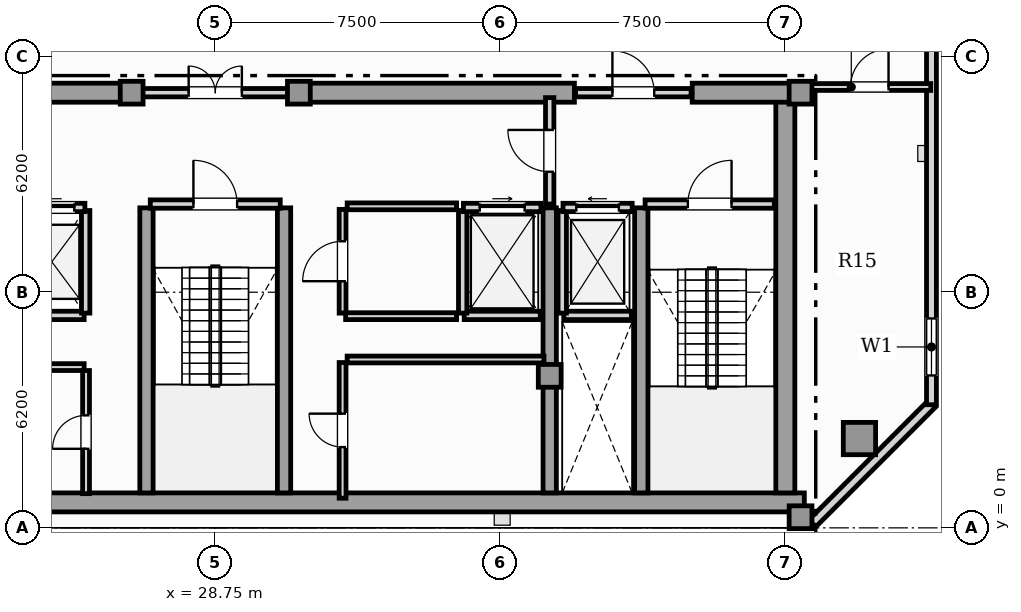
"""IFC4 building model, lengths in metres.
Left out: names, types, materials, properties, quantities, classifications, styles, units other than length and angle.
Written with IfcOpenShell. Run it as: python <this file> out.ifc"""

import sys

from ifc_helpers import new_model, si_unit, direction, frame, frame_2d, origin, origin_2d, place, context, subcontext, project, spatial, rectangle, hollow_rectangle, extrude, element, fill, save


model = new_model("IFC4")
c1 = context("Model", 3, precision=1e-05, world=origin(), true_north=direction((0.0, 1.0)))
c2 = subcontext(c1, "Body", "Model", "MODEL_VIEW")
j1 = project(units=[si_unit("LENGTHUNIT", "METRE"), si_unit("PLANEANGLEUNIT", "RADIAN")], contexts=[c1])
p1 = place(None, origin())
s1 = spatial("IfcSite", under=j1, at=p1, CompositionType="ELEMENT")
p2 = place(p1, origin())
s2 = spatial("IfcBuilding", under=s1, at=p2, CompositionType="ELEMENT")
p3 = place(p2, frame((0.0, 0.0, 362.25)))
s3 = spatial("IfcBuildingStorey", under=s2, at=p3, CompositionType="ELEMENT", Elevation=362.25)
p4 = place(p3, frame((13.25, 0.67, 0.0), z_axis=(0.0, 0.0, 1.0), x_axis=(1.0, 0.0, 0.0)))
e1 = element("IfcWall", 1, at=p4, inside=s3, PredefinedType="SHEAR", context=c2, shape_type="SweptSolid", body=[
    extrude(rectangle(XDim=31.0, YDim=0.5, at=frame_2d((15.5, 0.0))), origin(), (0.0, 0.0, 1.0), 4.1),
])
p5 = place(p3, frame((43.75, 0.92, 0.0), z_axis=(0.0, 0.0, 1.0), x_axis=(0.0, 1.0, 0.0)))
e2 = element("IfcWall", 2, at=p5, inside=s3, PredefinedType="SHEAR", context=c2, shape_type="SweptSolid", body=[
    extrude(rectangle(XDim=10.53, YDim=0.5, at=frame_2d((5.265, 0.0))), origin(), (0.0, 0.0, 1.0), 4.1),
])
for number, where, z_axis, x_axis in (
    (3, (19.3, 11.45, 0.0), (0.0, 0.0, 1.0), (1.0, 0.0, 0.0)),
    (4, (30.9, 11.45, 0.0), (0.0, 0.0, 1.0), (1.0, 0.0, 0.0)),
):
    element("IfcWall", number, at=place(p3, frame(where, z_axis=z_axis, x_axis=x_axis)), inside=s3, PredefinedType="SHEAR", context=c2, shape_type="SweptSolid", body=[
        extrude(rectangle(XDim=7.3, YDim=0.5, at=frame_2d((3.65, 0.0))), origin(), (0.0, 0.0, 1.0), 4.1),
    ])
p6 = place(p3, frame((41.3, 11.45, 0.0), z_axis=(0.0, 0.0, 1.0), x_axis=(1.0, 0.0, 0.0)))
e5 = element("IfcWall", 5, at=p6, inside=s3, PredefinedType="SHEAR", context=c2, shape_type="SweptSolid", body=[
    extrude(rectangle(XDim=2.95, YDim=0.5, at=frame_2d((1.475, 0.0))), origin(), (0.0, 0.0, 1.0), 4.1),
])
for number, where, z_axis, x_axis in (
    (6, (26.94, 0.92, 0.0), (0.0, 0.0, 1.0), (0.0, 1.0, 0.0)),
    (7, (30.56, 0.92, 0.0), (0.0, 0.0, 1.0), (0.0, 1.0, 0.0)),
    (8, (37.55, 0.92, 0.0), (0.0, 0.0, 1.0), (0.0, 1.0, 0.0)),
    (9, (39.96, 0.92, 0.0), (0.0, 0.0, 1.0), (0.0, 1.0, 0.0)),
):
    element("IfcWall", number, at=place(p3, frame(where, z_axis=z_axis, x_axis=x_axis)), inside=s3, PredefinedType="SHEAR", context=c2, shape_type="SweptSolid", body=[
        extrude(rectangle(XDim=7.5, YDim=0.35, at=frame_2d((3.75, 0.0))), origin(), (0.0, 0.0, 1.0), 4.1),
    ])
for number, where, z_axis, x_axis in (
    (10, (44.15, 0.28, 0.0), (0.0, 0.0, 1.0), (1.0, 0.0, 0.0)),
    (11, (44.15, 11.45, 0.0), (0.0, 0.0, 1.0), (1.0, 0.0, 0.0)),
    (12, (37.55, 4.0, 0.0), (0.0, 0.0, 1.0), (1.0, 0.0, 0.0)),
    (13, (26.55, 11.45, 0.0), (0.0, 0.0, 1.0), (1.0, 0.0, 0.0)),
    (14, (30.95, 11.45, 0.0), (0.0, 0.0, 1.0), (1.0, 0.0, 0.0)),
):
    element("IfcColumn", number, at=place(p3, frame(where, z_axis=z_axis, x_axis=x_axis)), inside=s3, PredefinedType="COLUMN", context=c2, shape_type="SweptSolid", body=[
        extrude(rectangle(XDim=0.6, YDim=0.6, at=origin_2d()), origin(), (0.0, 0.0, 1.0), 4.4),
    ])
p7 = place(p3, frame((45.7, 2.35, 0.0), z_axis=(0.0, 0.0, 1.0), x_axis=(1.0, 0.0, 0.0)))
e15 = element("IfcColumn", 15, at=p7, inside=s3, PredefinedType="USERDEFINED", context=c2, shape_type="SweptSolid", body=[
    extrude(hollow_rectangle(XDim=0.85, YDim=0.85, WallThickness=0.05, at=origin_2d()), origin(), (0.0, 0.0, 1.0), 4.35),
])
p8 = place(p3, frame((44.461, 0.12, 0.0), z_axis=(0.0, 0.0, 1.0), x_axis=(0.707079321262, 0.707134240044, 0.0)))
e16 = element("IfcWall", 16, at=p8, inside=s3, PredefinedType="SOLIDWALL", context=c2, shape_type="SweptSolid", body=[
    extrude(rectangle(XDim=4.446, YDim=0.26, at=frame_2d((2.223, 0.0))), origin(), (0.0, 0.0, 1.0), 4.1),
])
p9 = place(p3, frame((47.595, 3.24, 0.0), z_axis=(0.0, 0.0, 1.0), x_axis=(0.0, 1.0, 0.0)))
e17 = element("IfcWall", 17, at=p9, inside=s3, PredefinedType="SOLIDWALL", context=c2, shape_type="SweptSolid", body=[
    extrude(rectangle(XDim=24.14, YDim=0.26, at=frame_2d((12.07, 0.0))), origin(), (0.0, 0.0, 1.0), 4.1),
])
p10 = place(p9, frame((0.77, 0.0, 0.9)))
e18 = element("IfcOpeningElement", 18, at=p10, cuts=e17, PredefinedType="OPENING", context=c2, shape_type="SweptSolid", body=[
    extrude(rectangle(XDim=1.5, YDim=1.95, at=frame_2d((0.75, 0.975))), frame((0.0, 0.14, 0.0), z_axis=(0.0, -1.0, 0.0), x_axis=(1.0, 0.0, 0.0)), (0.0, 0.0, 1.0), 0.28),
])
p11 = place(p9, frame((20.41, 0.0, 0.95)))
e19 = element("IfcOpeningElement", 19, at=p11, cuts=e17, PredefinedType="OPENING", context=c2, shape_type="SweptSolid", body=[
    extrude(rectangle(XDim=0.9, YDim=1.5, at=frame_2d((0.45, 0.75))), frame((0.0, 0.14, 0.0), z_axis=(0.0, -1.0, 0.0), x_axis=(1.0, 0.0, 0.0)), (0.0, 0.0, 1.0), 0.28),
])
p12 = place(p9, frame((10.415, 0.0, 0.95)))
e20 = element("IfcOpeningElement", 20, at=p12, cuts=e17, PredefinedType="OPENING", context=c2, shape_type="SweptSolid", body=[
    extrude(rectangle(XDim=0.9, YDim=1.5, at=frame_2d((0.45, 0.75))), frame((0.0, 0.14, 0.0), z_axis=(0.0, -1.0, 0.0), x_axis=(1.0, 0.0, 0.0)), (0.0, 0.0, 1.0), 0.28),
])
p13 = place(p9, frame((12.876, 0.0, 0.9)))
e21 = element("IfcOpeningElement", 21, at=p13, cuts=e17, PredefinedType="OPENING", context=c2, shape_type="SweptSolid", body=[
    extrude(rectangle(XDim=1.5, YDim=1.95, at=frame_2d((0.75, 0.975))), frame((0.0, 0.14, 0.0), z_axis=(0.0, -1.0, 0.0), x_axis=(1.0, 0.0, 0.0)), (0.0, 0.0, 1.0), 0.28),
])
p14 = place(p9, frame((17.041, 0.0, 0.9)))
e22 = element("IfcOpeningElement", 22, at=p14, cuts=e17, PredefinedType="OPENING", context=c2, shape_type="SweptSolid", body=[
    extrude(rectangle(XDim=1.5, YDim=1.95, at=frame_2d((0.75, 0.975))), frame((0.0, 0.14, 0.0), z_axis=(0.0, -1.0, 0.0), x_axis=(1.0, 0.0, 0.0)), (0.0, 0.0, 1.0), 0.28),
])
p15 = place(p9, frame((21.87, 0.0, 0.9)))
e23 = element("IfcOpeningElement", 23, at=p15, cuts=e17, PredefinedType="OPENING", context=c2, shape_type="SweptSolid", body=[
    extrude(rectangle(XDim=1.5, YDim=1.95, at=frame_2d((0.75, 0.975))), frame((0.0, 0.14, 0.0), z_axis=(0.0, -1.0, 0.0), x_axis=(1.0, 0.0, 0.0)), (0.0, 0.0, 1.0), 0.28),
])
p16 = place(p3, frame((37.92, 5.59, 0.0), z_axis=(0.0, 0.0, 1.0), x_axis=(1.0, 0.0, 0.0)))
e24 = element("IfcWall", 24, at=p16, inside=s3, PredefinedType="SOLIDWALL", context=c2, shape_type="SweptSolid", body=[
    extrude(rectangle(XDim=1.78, YDim=0.22, at=frame_2d((0.89, 0.0))), origin(), (0.0, 0.0, 1.0), 4.1),
])
p17 = place(p3, frame((37.88, 5.65, 0.0), z_axis=(0.0, 0.0, 1.0), x_axis=(0.0, 1.0, 0.0)))
e25 = element("IfcWall", 25, at=p17, inside=s3, PredefinedType="SOLIDWALL", context=c2, shape_type="SweptSolid", body=[
    extrude(rectangle(XDim=2.7, YDim=0.22, at=frame_2d((1.35, 0.0))), origin(), (0.0, 0.0, 1.0), 4.1),
])
p18 = place(p3, frame((37.9, 8.43, 0.0), z_axis=(0.0, 0.0, 1.0), x_axis=(1.0, 0.0, 0.0)))
e26 = element("IfcWall", 26, at=p18, inside=s3, PredefinedType="SOLIDWALL", context=c2, shape_type="SweptSolid", body=[
    extrude(rectangle(XDim=1.82, YDim=0.22, at=frame_2d((0.91, 0.0))), origin(), (0.0, 0.0, 1.0), 4.1),
])
p19 = place(p18, frame((0.35, 0.0, 0.0)))
e27 = element("IfcOpeningElement", 27, at=p19, cuts=e26, PredefinedType="OPENING", context=c2, shape_type="SweptSolid", body=[
    extrude(rectangle(XDim=1.12, YDim=2.25, at=frame_2d((0.56, 1.125))), frame((0.0, 0.12, 0.0), z_axis=(0.0, -1.0, 0.0), x_axis=(1.0, 0.0, 0.0)), (0.0, 0.0, 1.0), 0.24),
])
p20 = place(p3, frame((35.3, 5.59, 0.0), z_axis=(0.0, 0.0, 1.0), x_axis=(1.0, 0.0, 0.0)))
e28 = element("IfcWall", 28, at=p20, inside=s3, PredefinedType="SOLIDWALL", context=c2, shape_type="SweptSolid", body=[
    extrude(rectangle(XDim=2.0, YDim=0.22, at=frame_2d((1.0, 0.0))), origin(), (0.0, 0.0, 1.0), 4.1),
])
p21 = place(p3, frame((35.26, 5.65, 0.0), z_axis=(0.0, 0.0, 1.0), x_axis=(0.0, 1.0, 0.0)))
e29 = element("IfcWall", 29, at=p21, inside=s3, PredefinedType="SOLIDWALL", context=c2, shape_type="SweptSolid", body=[
    extrude(rectangle(XDim=2.7, YDim=0.22, at=frame_2d((1.35, 0.0))), origin(), (0.0, 0.0, 1.0), 4.1),
])
p22 = place(p3, frame((35.28, 8.43, 0.0), z_axis=(0.0, 0.0, 1.0), x_axis=(1.0, 0.0, 0.0)))
e30 = element("IfcWall", 30, at=p22, inside=s3, PredefinedType="SOLIDWALL", context=c2, shape_type="SweptSolid", body=[
    extrude(rectangle(XDim=2.04, YDim=0.22, at=frame_2d((1.02, 0.0))), origin(), (0.0, 0.0, 1.0), 4.1),
])
p23 = place(p22, frame((0.43, 0.0, 0.0)))
e31 = element("IfcOpeningElement", 31, at=p23, cuts=e30, PredefinedType="OPENING", context=c2, shape_type="SweptSolid", body=[
    extrude(rectangle(XDim=1.18, YDim=2.2, at=frame_2d((0.59, 1.1))), frame((0.0, 0.12, 0.0), z_axis=(0.0, -1.0, 0.0), x_axis=(1.0, 0.0, 0.0)), (0.0, 0.0, 1.0), 0.24),
])
p24 = place(p3, frame((23.6, 5.59, 0.0), z_axis=(0.0, 0.0, 1.0), x_axis=(1.0, 0.0, 0.0)))
e32 = element("IfcWall", 32, at=p24, inside=s3, PredefinedType="SOLIDWALL", context=c2, shape_type="SweptSolid", body=[
    extrude(rectangle(XDim=1.7, YDim=0.22, at=frame_2d((0.85, 0.0))), origin(), (0.0, 0.0, 1.0), 4.1),
])
p25 = place(p3, frame((25.34, 5.65, 0.0), z_axis=(0.0, 0.0, 1.0), x_axis=(0.0, 1.0, 0.0)))
e33 = element("IfcWall", 33, at=p25, inside=s3, PredefinedType="SOLIDWALL", context=c2, shape_type="SweptSolid", body=[
    extrude(rectangle(XDim=2.7, YDim=0.22, at=frame_2d((1.35, 0.0))), origin(), (0.0, 0.0, 1.0), 4.1),
])
p26 = place(p3, frame((23.58, 8.43, 0.0), z_axis=(0.0, 0.0, 1.0), x_axis=(1.0, 0.0, 0.0)))
e34 = element("IfcWall", 34, at=p26, inside=s3, PredefinedType="SOLIDWALL", context=c2, shape_type="SweptSolid", body=[
    extrude(rectangle(XDim=1.74, YDim=0.22, at=frame_2d((0.87, 0.0))), origin(), (0.0, 0.0, 1.0), 4.1),
])
p27 = place(p26, frame((0.28, 0.0, 0.0)))
e35 = element("IfcOpeningElement", 35, at=p27, cuts=e34, PredefinedType="OPENING", context=c2, shape_type="SweptSolid", body=[
    extrude(rectangle(XDim=1.18, YDim=2.2, at=frame_2d((0.59, 1.1))), frame((0.0, 0.12, 0.0), z_axis=(0.0, -1.0, 0.0), x_axis=(1.0, 0.0, 0.0)), (0.0, 0.0, 1.0), 0.24),
])
p28 = place(p3, frame((40.06, 8.52, 0.0), z_axis=(0.0, 0.0, 1.0), x_axis=(1.0, 0.0, 0.0)))
e36 = element("IfcWall", 36, at=p28, inside=s3, PredefinedType="SOLIDWALL", context=c2, shape_type="SweptSolid", body=[
    extrude(rectangle(XDim=3.4, YDim=0.22, at=frame_2d((1.7, 0.0))), origin(), (0.0, 0.0, 1.0), 4.1),
])
p29 = place(p28, frame((1.125, 0.0, 0.0)))
e37 = element("IfcOpeningElement", 37, at=p29, cuts=e36, PredefinedType="OPENING", context=c2, shape_type="SweptSolid", body=[
    extrude(rectangle(XDim=1.15, YDim=2.2, at=frame_2d((0.575, 1.1))), frame((0.0, 0.12, 0.0), z_axis=(0.0, -1.0, 0.0), x_axis=(1.0, 0.0, 0.0)), (0.0, 0.0, 1.0), 0.24),
])
p30 = place(p3, frame((27.04, 8.52, 0.0), z_axis=(0.0, 0.0, 1.0), x_axis=(1.0, 0.0, 0.0)))
e38 = element("IfcWall", 38, at=p30, inside=s3, PredefinedType="SOLIDWALL", context=c2, shape_type="SweptSolid", body=[
    extrude(rectangle(XDim=3.42, YDim=0.22, at=frame_2d((1.71, 0.0))), origin(), (0.0, 0.0, 1.0), 4.1),
])
p31 = place(p30, frame((1.135, 0.0, 0.0)))
e39 = element("IfcOpeningElement", 39, at=p31, cuts=e38, PredefinedType="OPENING", context=c2, shape_type="SweptSolid", body=[
    extrude(rectangle(XDim=1.15, YDim=2.2, at=frame_2d((0.575, 1.1))), frame((0.0, 0.12, 0.0), z_axis=(0.0, -1.0, 0.0), x_axis=(1.0, 0.0, 0.0)), (0.0, 0.0, 1.0), 0.24),
])
p32 = place(p3, frame((37.55, 8.52, 0.0), z_axis=(0.0, 0.0, 1.0), x_axis=(0.0, 1.0, 0.0)))
e40 = element("IfcWall", 40, at=p32, inside=s3, PredefinedType="SOLIDWALL", context=c2, shape_type="SweptSolid", body=[
    extrude(rectangle(XDim=2.8, YDim=0.22, at=frame_2d((1.4, 0.0))), origin(), (0.0, 0.0, 1.0), 3.555),
])
p33 = place(p32, frame((0.85, 0.0, 0.0)))
e41 = element("IfcOpeningElement", 41, at=p33, cuts=e40, PredefinedType="OPENING", context=c2, shape_type="SweptSolid", body=[
    extrude(rectangle(XDim=1.1, YDim=2.2, at=frame_2d((0.55, 1.1))), frame((0.0, 0.12, 0.0), z_axis=(0.0, -1.0, 0.0), x_axis=(1.0, 0.0, 0.0)), (0.0, 0.0, 1.0), 0.24),
])
p34 = place(p3, frame((26.63, 11.45, 0.0), z_axis=(0.0, 0.0, 1.0), x_axis=(1.0, 0.0, 0.0)))
e42 = element("IfcWall", 42, at=p34, inside=s3, PredefinedType="SOLIDWALL", context=c2, shape_type="SweptSolid", body=[
    extrude(rectangle(XDim=4.24, YDim=0.22, at=frame_2d((2.12, 0.0))), origin(), (0.0, 0.0, 1.0), 4.1),
])
p35 = place(p34, frame((1.42, 0.0, 0.0)))
e43 = element("IfcOpeningElement", 43, at=p35, cuts=e42, PredefinedType="OPENING", context=c2, shape_type="SweptSolid", body=[
    extrude(rectangle(XDim=1.4, YDim=2.2, at=frame_2d((0.7, 1.1))), frame((0.0, 0.12, 0.0), z_axis=(0.0, -1.0, 0.0), x_axis=(1.0, 0.0, 0.0)), (0.0, 0.0, 1.0), 0.24),
])
p36 = place(p3, frame((38.23, 11.45, 0.0), z_axis=(0.0, 0.0, 1.0), x_axis=(1.0, 0.0, 0.0)))
e44 = element("IfcWall", 44, at=p36, inside=s3, PredefinedType="SOLIDWALL", context=c2, shape_type="SweptSolid", body=[
    extrude(rectangle(XDim=3.04, YDim=0.22, at=frame_2d((1.52, 0.0))), origin(), (0.0, 0.0, 1.0), 4.1),
])
p37 = place(p36, frame((0.97, 0.0, 0.0)))
e45 = element("IfcOpeningElement", 45, at=p37, cuts=e44, PredefinedType="OPENING", context=c2, shape_type="SweptSolid", body=[
    extrude(rectangle(XDim=1.1, YDim=2.2, at=frame_2d((0.55, 1.1))), frame((0.0, 0.12, 0.0), z_axis=(0.0, -1.0, 0.0), x_axis=(1.0, 0.0, 0.0)), (0.0, 0.0, 1.0), 0.24),
])
p38 = place(p3, frame((25.35, 0.9, 0.0), z_axis=(0.0, 0.0, 1.0), x_axis=(0.0, 1.0, 0.0)))
e46 = element("IfcWall", 46, at=p38, inside=s3, PredefinedType="PARTITIONING", context=c2, shape_type="SweptSolid", body=[
    extrude(rectangle(XDim=3.24, YDim=0.18, at=frame_2d((1.62, 0.0))), origin(), (0.0, 0.0, 1.0), 4.1),
])
p39 = place(p38, frame((1.18, 0.0, 0.0)))
e47 = element("IfcOpeningElement", 47, at=p39, cuts=e46, PredefinedType="OPENING", context=c2, shape_type="SweptSolid", body=[
    extrude(rectangle(XDim=0.88, YDim=2.05, at=frame_2d((0.44, 1.025))), frame((0.0, 0.1, 0.0), z_axis=(0.0, -1.0, 0.0), x_axis=(1.0, 0.0, 0.0)), (0.0, 0.0, 1.0), 0.2),
])
p40 = place(p3, frame((19.98, 4.23, 0.0), z_axis=(0.0, 0.0, 1.0), x_axis=(1.0, 0.0, 0.0)))
e48 = element("IfcWall", 48, at=p40, inside=s3, PredefinedType="PARTITIONING", context=c2, shape_type="SweptSolid", body=[
    extrude(rectangle(XDim=5.32, YDim=0.18, at=frame_2d((2.66, 0.0))), origin(), (0.0, 0.0, 1.0), 4.1),
])
p41 = place(p3, frame((32.1, 0.78, 0.0), z_axis=(0.0, 0.0, 1.0), x_axis=(0.0, 1.0, 0.0)))
e49 = element("IfcWall", 49, at=p41, inside=s3, PredefinedType="PARTITIONING", context=c2, shape_type="SweptSolid", body=[
    extrude(rectangle(XDim=3.57, YDim=0.18, at=frame_2d((1.785, 0.0))), origin(), (0.0, 0.0, 1.0), 4.1),
])
p42 = place(p41, frame((1.345, 0.0, 0.0)))
e50 = element("IfcOpeningElement", 50, at=p42, cuts=e49, PredefinedType="OPENING", context=c2, shape_type="SweptSolid", body=[
    extrude(rectangle(XDim=0.88, YDim=2.05, at=frame_2d((0.44, 1.025))), frame((0.0, 0.1, 0.0), z_axis=(0.0, -1.0, 0.0), x_axis=(1.0, 0.0, 0.0)), (0.0, 0.0, 1.0), 0.2),
])
p43 = place(p3, frame((32.22, 4.43, 0.0), z_axis=(0.0, 0.0, 1.0), x_axis=(1.0, 0.0, 0.0)))
e51 = element("IfcWall", 51, at=p43, inside=s3, PredefinedType="PARTITIONING", context=c2, shape_type="SweptSolid", body=[
    extrude(rectangle(XDim=5.18, YDim=0.18, at=frame_2d((2.59, 0.0))), origin(), (0.0, 0.0, 1.0), 4.1),
])
p44 = place(p3, frame((32.1, 5.65, 0.0), z_axis=(0.0, 0.0, 1.0), x_axis=(0.0, 1.0, 0.0)))
e52 = element("IfcWall", 52, at=p44, inside=s3, PredefinedType="PARTITIONING", context=c2, shape_type="SweptSolid", body=[
    extrude(rectangle(XDim=2.73, YDim=0.18, at=frame_2d((1.365, 0.0))), origin(), (0.0, 0.0, 1.0), 4.1),
])
p45 = place(p44, frame((0.84, 0.0, 0.0)))
e53 = element("IfcOpeningElement", 53, at=p45, cuts=e52, PredefinedType="OPENING", context=c2, shape_type="SweptSolid", body=[
    extrude(rectangle(XDim=1.05, YDim=2.15, at=frame_2d((0.525, 1.075))), frame((0.0, 0.1, 0.0), z_axis=(0.0, -1.0, 0.0), x_axis=(1.0, 0.0, 0.0)), (0.0, 0.0, 1.0), 0.2),
])
p46 = place(p3, frame((32.22, 8.46, 0.0), z_axis=(0.0, 0.0, 1.0), x_axis=(1.0, 0.0, 0.0)))
e54 = element("IfcWall", 54, at=p46, inside=s3, PredefinedType="PARTITIONING", context=c2, shape_type="SweptSolid", body=[
    extrude(rectangle(XDim=2.88, YDim=0.18, at=frame_2d((1.44, 0.0))), origin(), (0.0, 0.0, 1.0), 4.1),
])
p47 = place(p3, frame((32.18, 5.57, 0.0), z_axis=(0.0, 0.0, 1.0), x_axis=(1.0, 0.0, 0.0)))
e55 = element("IfcWall", 55, at=p47, inside=s3, PredefinedType="PARTITIONING", context=c2, shape_type="SweptSolid", body=[
    extrude(rectangle(XDim=2.92, YDim=0.18, at=frame_2d((1.46, 0.0))), origin(), (0.0, 0.0, 1.0), 4.1),
])
p48 = place(p3, frame((44.355, 11.6, 0.0), z_axis=(0.0, 0.0, 1.0), x_axis=(1.0, 0.0, 0.0)))
e56 = element("IfcWall", 56, at=p48, inside=s3, PredefinedType="PARTITIONING", context=c2, shape_type="SweptSolid", body=[
    extrude(rectangle(XDim=3.22, YDim=0.18, at=frame_2d((1.61, 0.0))), origin(), (0.0, 0.0, 1.0), 4.1),
])
p49 = place(p48, frame((1.11, 0.0, 0.0)))
e57 = element("IfcOpeningElement", 57, at=p49, cuts=e56, PredefinedType="OPENING", context=c2, shape_type="SweptSolid", body=[
    extrude(rectangle(XDim=1.0, YDim=2.15, at=frame_2d((0.5, 1.075))), frame((0.0, 0.1, 0.0), z_axis=(0.0, -1.0, 0.0), x_axis=(1.0, 0.0, 0.0)), (0.0, 0.0, 1.0), 0.2),
])
p50 = place(p10, origin())
e58 = element("IfcWindow", 58, at=p50, inside=s3, PartitioningType="SINGLE_PANEL", PredefinedType="WINDOW", context=c2, shape_type="SweptSolid", body=[
    extrude(rectangle(XDim=1.5, YDim=1.95, at=frame_2d((0.75, 0.975))), frame((0.0, 0.03, 0.0), z_axis=(0.0, -1.0, 0.0), x_axis=(1.0, 0.0, 0.0)), (0.0, 0.0, 1.0), 0.06),
])
fill(e18, e58)
p51 = place(p19, origin())
e59 = element("IfcDoor", 59, at=p51, inside=s3, OperationType="SLIDING_TO_LEFT", PredefinedType="DOOR", context=c2, shape_type="SweptSolid", body=[
    extrude(rectangle(XDim=1.12, YDim=2.25, at=frame_2d((0.56, 1.125))), frame((0.0, 0.025, 0.0), z_axis=(0.0, -1.0, 0.0), x_axis=(1.0, 0.0, 0.0)), (0.0, 0.0, 1.0), 0.05),
])
fill(e27, e59)
p52 = place(p23, origin())
e60 = element("IfcDoor", 60, at=p52, inside=s3, OperationType="SLIDING_TO_RIGHT", PredefinedType="DOOR", context=c2, shape_type="SweptSolid", body=[
    extrude(rectangle(XDim=1.18, YDim=2.2, at=frame_2d((0.59, 1.1))), frame((0.0, 0.025, 0.0), z_axis=(0.0, -1.0, 0.0), x_axis=(1.0, 0.0, 0.0)), (0.0, 0.0, 1.0), 0.05),
])
fill(e31, e60)
p53 = place(p27, origin())
e61 = element("IfcDoor", 61, at=p53, inside=s3, OperationType="SLIDING_TO_LEFT", PredefinedType="DOOR", context=c2, shape_type="SweptSolid", body=[
    extrude(rectangle(XDim=1.18, YDim=2.2, at=frame_2d((0.59, 1.1))), frame((0.0, 0.025, 0.0), z_axis=(0.0, -1.0, 0.0), x_axis=(1.0, 0.0, 0.0)), (0.0, 0.0, 1.0), 0.05),
])
fill(e35, e61)
p54 = place(p29, origin())
e62 = element("IfcDoor", 62, at=p54, inside=s3, OperationType="SINGLE_SWING_RIGHT", PredefinedType="DOOR", context=c2, shape_type="SweptSolid", body=[
    extrude(rectangle(XDim=1.15, YDim=2.2, at=frame_2d((0.575, 1.1))), frame((0.0, 0.025, 0.0), z_axis=(0.0, -1.0, 0.0), x_axis=(1.0, 0.0, 0.0)), (0.0, 0.0, 1.0), 0.05),
])
fill(e37, e62)
p55 = place(p31, origin())
e63 = element("IfcDoor", 63, at=p55, inside=s3, OperationType="SINGLE_SWING_LEFT", PredefinedType="DOOR", context=c2, shape_type="SweptSolid", body=[
    extrude(rectangle(XDim=1.15, YDim=2.2, at=frame_2d((0.575, 1.1))), frame((0.0, 0.025, 0.0), z_axis=(0.0, -1.0, 0.0), x_axis=(1.0, 0.0, 0.0)), (0.0, 0.0, 1.0), 0.05),
])
fill(e39, e63)
p56 = place(p33, origin())
e64 = element("IfcDoor", 64, at=p56, inside=s3, OperationType="SINGLE_SWING_RIGHT", PredefinedType="DOOR", context=c2, shape_type="SweptSolid", body=[
    extrude(rectangle(XDim=1.1, YDim=2.2, at=frame_2d((0.55, 1.1))), frame((0.0, 0.025, 0.0), z_axis=(0.0, -1.0, 0.0), x_axis=(1.0, 0.0, 0.0)), (0.0, 0.0, 1.0), 0.05),
])
fill(e41, e64)
p57 = place(p35, origin())
e65 = element("IfcDoor", 65, at=p57, inside=s3, OperationType="DOUBLE_DOOR_SINGLE_SWING", PredefinedType="DOOR", context=c2, shape_type="SweptSolid", body=[
    extrude(rectangle(XDim=1.4, YDim=2.2, at=frame_2d((0.7, 1.1))), frame((0.0, 0.025, 0.0), z_axis=(0.0, -1.0, 0.0), x_axis=(1.0, 0.0, 0.0)), (0.0, 0.0, 1.0), 0.05),
])
fill(e43, e65)
p58 = place(p37, origin())
e66 = element("IfcDoor", 66, at=p58, inside=s3, OperationType="SINGLE_SWING_LEFT", PredefinedType="DOOR", context=c2, shape_type="SweptSolid", body=[
    extrude(rectangle(XDim=1.1, YDim=2.2, at=frame_2d((0.55, 1.1))), frame((0.0, 0.025, 0.0), z_axis=(0.0, -1.0, 0.0), x_axis=(1.0, 0.0, 0.0)), (0.0, 0.0, 1.0), 0.05),
])
fill(e45, e66)
p59 = place(p39, origin())
e67 = element("IfcDoor", 67, at=p59, inside=s3, OperationType="SINGLE_SWING_LEFT", PredefinedType="DOOR", context=c2, shape_type="SweptSolid", body=[
    extrude(rectangle(XDim=0.88, YDim=2.05, at=frame_2d((0.44, 1.025))), frame((0.0, 0.025, 0.0), z_axis=(0.0, -1.0, 0.0), x_axis=(1.0, 0.0, 0.0)), (0.0, 0.0, 1.0), 0.05),
])
fill(e47, e67)
p60 = place(p42, origin())
e68 = element("IfcDoor", 68, at=p60, inside=s3, OperationType="SINGLE_SWING_RIGHT", PredefinedType="DOOR", context=c2, shape_type="SweptSolid", body=[
    extrude(rectangle(XDim=0.88, YDim=2.05, at=frame_2d((0.44, 1.025))), frame((0.0, 0.025, 0.0), z_axis=(0.0, -1.0, 0.0), x_axis=(1.0, 0.0, 0.0)), (0.0, 0.0, 1.0), 0.05),
])
fill(e50, e68)
p61 = place(p45, origin())
e69 = element("IfcDoor", 69, at=p61, inside=s3, OperationType="SINGLE_SWING_LEFT", PredefinedType="DOOR", context=c2, shape_type="SweptSolid", body=[
    extrude(rectangle(XDim=1.05, YDim=2.15, at=frame_2d((0.525, 1.075))), frame((0.0, 0.025, 0.0), z_axis=(0.0, -1.0, 0.0), x_axis=(1.0, 0.0, 0.0)), (0.0, 0.0, 1.0), 0.05),
])
fill(e53, e69)
p62 = place(p49, origin())
e70 = element("IfcDoor", 70, at=p62, inside=s3, OperationType="SINGLE_SWING_RIGHT", PredefinedType="DOOR", context=c2, shape_type="SweptSolid", body=[
    extrude(rectangle(XDim=1.0, YDim=2.15, at=frame_2d((0.5, 1.075))), frame((0.0, 0.025, 0.0), z_axis=(0.0, -1.0, 0.0), x_axis=(1.0, 0.0, 0.0)), (0.0, 0.0, 1.0), 0.05),
])
fill(e57, e70)
save(model, sys.argv[1])
